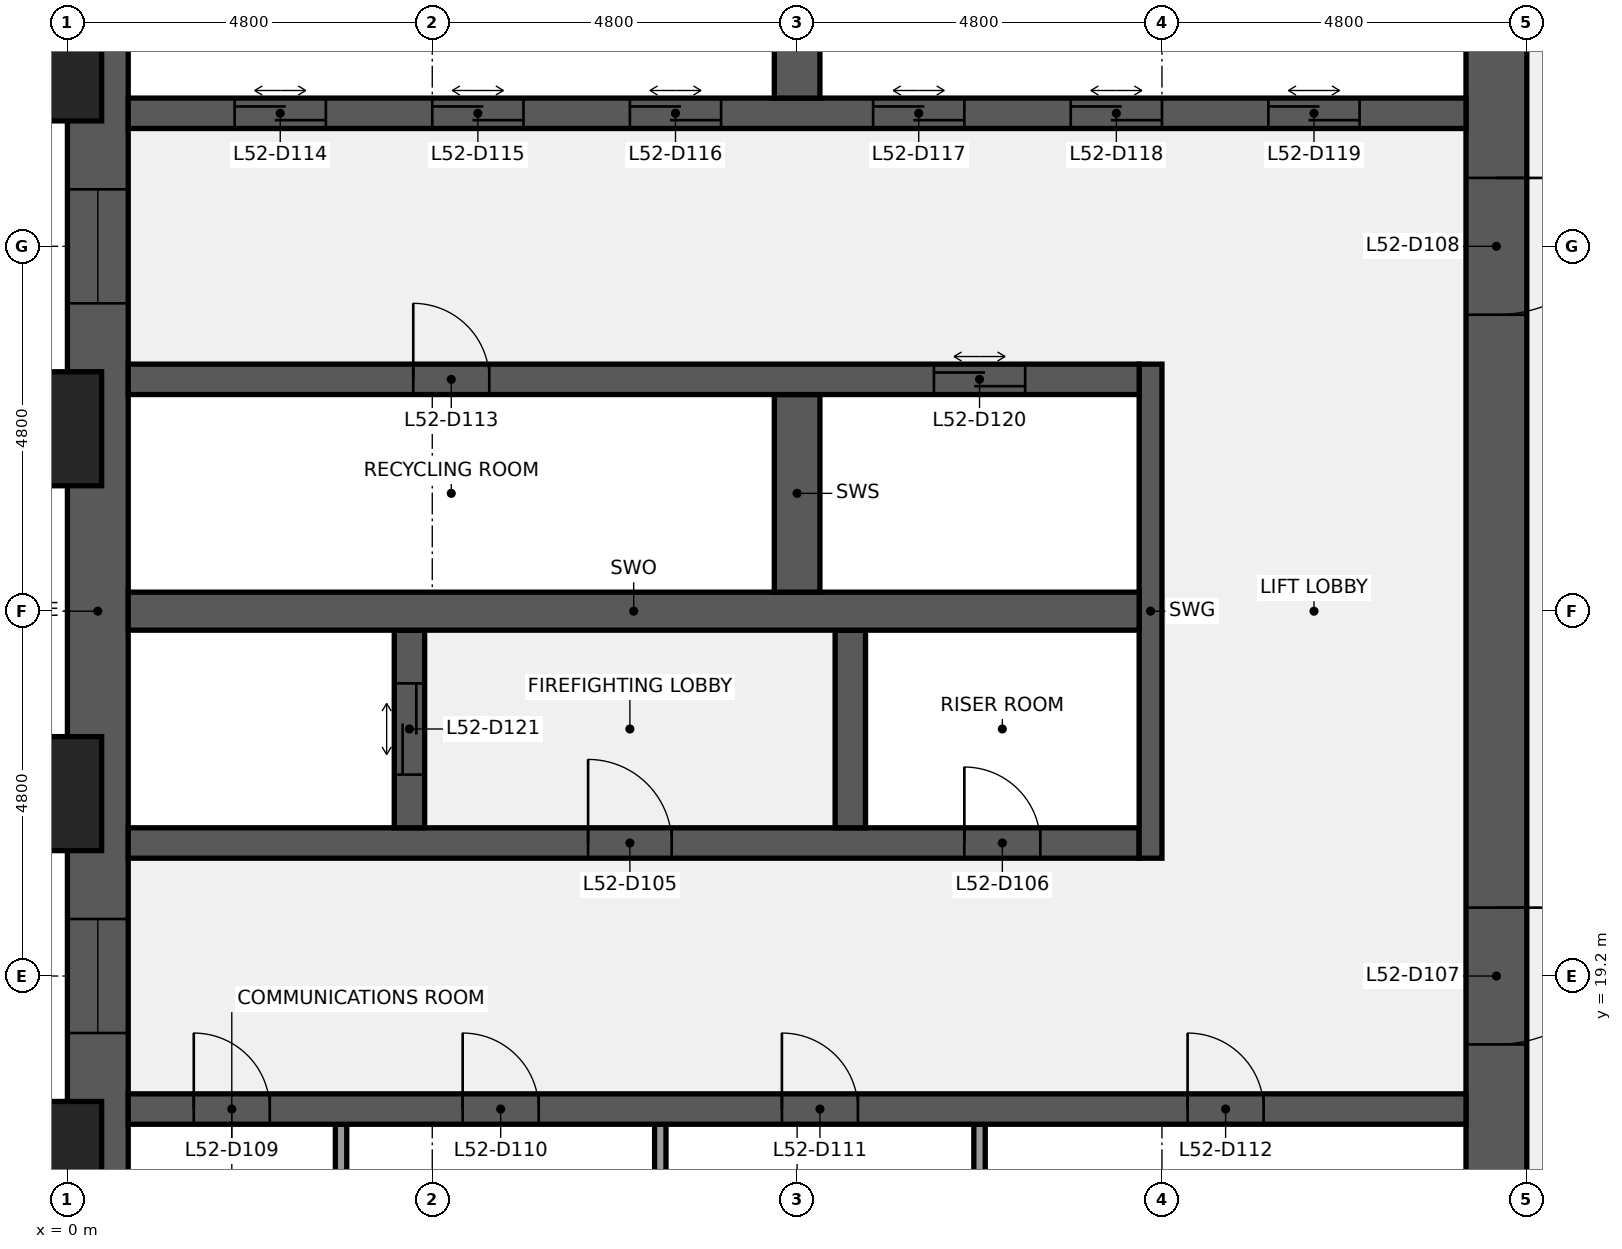
"""IFC4 building model, lengths in metres.
Left out: names, types, materials, properties, quantities, classifications, styles, units other than length and angle.
Written with IfcOpenShell. Run it as: python <this file> out.ifc"""

import sys

from ifc_helpers import new_model, si_unit, direction, frame, frame_2d, origin, origin_2d, place, context, subcontext, project, spatial, rectangle, extrude, element, fill, save


model = new_model("IFC4")
c1 = context("Model", 3, precision=1e-05, world=origin(), true_north=direction((0.0, 1.0)))
c2 = subcontext(c1, "Body", "Model", "MODEL_VIEW")
j1 = project(units=[si_unit("LENGTHUNIT", "METRE"), si_unit("PLANEANGLEUNIT", "RADIAN")], contexts=[c1])
p1 = place(None, origin())
s1 = spatial("IfcSite", under=j1, at=p1, CompositionType="ELEMENT")
p2 = place(p1, origin())
s2 = spatial("IfcBuilding", under=s1, at=p2, CompositionType="ELEMENT")
p3 = place(p2, frame((0.0, 0.0, 237.2)))
s3 = spatial("IfcBuildingStorey", under=s2, at=p3, CompositionType="ELEMENT", Elevation=237.2)
p4 = place(p3, frame((0.4, 9.6, 0.0), z_axis=(0.0, 0.0, 1.0), x_axis=(0.0, 1.0, 0.0)))
e1 = element("IfcWall", 1, at=p4, inside=s3, PredefinedType="SHEAR", context=c2, shape_type="SweptSolid", body=[
    extrude(rectangle(XDim=28.8, YDim=0.8, at=frame_2d((14.4, 0.0))), origin(), (0.0, 0.0, 1.0), 3.84),
])
p5 = place(p4, frame((8.85, 0.0, 0.9)))
e2 = element("IfcOpeningElement", 2, at=p5, cuts=e1, PredefinedType="OPENING", context=c2, shape_type="SweptSolid", body=[
    extrude(rectangle(XDim=1.5, YDim=1.5, at=frame_2d((0.75, 0.75))), frame((0.0, 0.41, 0.0), z_axis=(0.0, -1.0, 0.0), x_axis=(1.0, 0.0, 0.0)), (0.0, 0.0, 1.0), 0.82),
])
p6 = place(p4, frame((18.45, 0.0, 0.9)))
e3 = element("IfcOpeningElement", 3, at=p6, cuts=e1, PredefinedType="OPENING", context=c2, shape_type="SweptSolid", body=[
    extrude(rectangle(XDim=1.5, YDim=1.5, at=frame_2d((0.75, 0.75))), frame((0.0, 0.41, 0.0), z_axis=(0.0, -1.0, 0.0), x_axis=(1.0, 0.0, 0.0)), (0.0, 0.0, 1.0), 0.82),
])
p7 = place(p3, frame((18.8, 38.4, 0.0), z_axis=(0.0, 0.0, 1.0), x_axis=(0.0, -1.0, 0.0)))
e4 = element("IfcWall", 4, at=p7, inside=s3, PredefinedType="SHEAR", context=c2, shape_type="SweptSolid", body=[
    extrude(rectangle(XDim=28.8, YDim=0.8, at=frame_2d((14.4, 0.0))), origin(), (0.0, 0.0, 1.0), 3.84),
])
p8 = place(p7, frame((18.3, 0.0, 0.0)))
e5 = element("IfcOpeningElement", 5, at=p8, cuts=e4, PredefinedType="OPENING", context=c2, shape_type="SweptSolid", body=[
    extrude(rectangle(XDim=1.8, YDim=2.1, at=frame_2d((0.9, 1.05))), frame((0.0, 0.41, 0.0), z_axis=(0.0, -1.0, 0.0), x_axis=(1.0, 0.0, 0.0)), (0.0, 0.0, 1.0), 0.82),
])
p9 = place(p7, frame((8.7, 0.0, 0.0)))
e6 = element("IfcOpeningElement", 6, at=p9, cuts=e4, PredefinedType="OPENING", context=c2, shape_type="SweptSolid", body=[
    extrude(rectangle(XDim=1.8, YDim=2.1, at=frame_2d((0.9, 1.05))), frame((0.0, 0.41, 0.0), z_axis=(0.0, -1.0, 0.0), x_axis=(1.0, 0.0, 0.0)), (0.0, 0.0, 1.0), 0.82),
])
for number, where, z_axis, x_axis in (
    (7, (3.6, 14.65, 0.0), (0.0, 0.0, 1.0), (0.0, 1.0, 0.0)),
    (8, (7.8, 14.65, 0.0), (0.0, 0.0, 1.0), (0.0, 1.0, 0.0)),
    (9, (12.0, 14.65, 0.0), (0.0, 0.0, 1.0), (0.0, 1.0, 0.0)),
):
    element("IfcWall", number, at=place(p3, frame(where, z_axis=z_axis, x_axis=x_axis)), inside=s3, PredefinedType="PARTITIONING", context=c2, shape_type="SweptSolid", body=[
        extrude(rectangle(XDim=2.6, YDim=0.15, at=frame_2d((1.3, 0.0))), origin(), (0.0, 0.0, 1.0), 3.84),
    ])
p10 = place(p3, frame((0.8, 17.45, 0.0), z_axis=(0.0, 0.0, 1.0), x_axis=(1.0, 0.0, 0.0)))
e10 = element("IfcWall", 10, at=p10, inside=s3, PredefinedType="SHEAR", context=c2, shape_type="SweptSolid", body=[
    extrude(rectangle(XDim=17.6, YDim=0.4, at=frame_2d((8.8, 0.0))), origin(), (0.0, 0.0, 1.0), 3.84),
])
p11 = place(p10, frame((0.863, 0.0, 0.0)))
e11 = element("IfcOpeningElement", 11, at=p11, cuts=e10, PredefinedType="OPENING", context=c2, shape_type="SweptSolid", body=[
    extrude(rectangle(XDim=1.0, YDim=2.1, at=frame_2d((0.5, 1.05))), frame((0.0, 0.21, 0.0), z_axis=(0.0, -1.0, 0.0), x_axis=(1.0, 0.0, 0.0)), (0.0, 0.0, 1.0), 0.42),
])
p12 = place(p10, frame((4.4, 0.0, 0.0)))
e12 = element("IfcOpeningElement", 12, at=p12, cuts=e10, PredefinedType="OPENING", context=c2, shape_type="SweptSolid", body=[
    extrude(rectangle(XDim=1.0, YDim=2.1, at=frame_2d((0.5, 1.05))), frame((0.0, 0.21, 0.0), z_axis=(0.0, -1.0, 0.0), x_axis=(1.0, 0.0, 0.0)), (0.0, 0.0, 1.0), 0.42),
])
p13 = place(p10, frame((8.6, 0.0, 0.0)))
e13 = element("IfcOpeningElement", 13, at=p13, cuts=e10, PredefinedType="OPENING", context=c2, shape_type="SweptSolid", body=[
    extrude(rectangle(XDim=1.0, YDim=2.1, at=frame_2d((0.5, 1.05))), frame((0.0, 0.21, 0.0), z_axis=(0.0, -1.0, 0.0), x_axis=(1.0, 0.0, 0.0)), (0.0, 0.0, 1.0), 0.42),
])
p14 = place(p10, frame((13.938, 0.0, 0.0)))
e14 = element("IfcOpeningElement", 14, at=p14, cuts=e10, PredefinedType="OPENING", context=c2, shape_type="SweptSolid", body=[
    extrude(rectangle(XDim=1.0, YDim=2.1, at=frame_2d((0.5, 1.05))), frame((0.0, 0.21, 0.0), z_axis=(0.0, -1.0, 0.0), x_axis=(1.0, 0.0, 0.0)), (0.0, 0.0, 1.0), 0.42),
])
p15 = place(p3, frame((0.8, 20.95, 0.0), z_axis=(0.0, 0.0, 1.0), x_axis=(1.0, 0.0, 0.0)))
e15 = element("IfcWall", 15, at=p15, inside=s3, PredefinedType="SHEAR", context=c2, shape_type="SweptSolid", body=[
    extrude(rectangle(XDim=13.3, YDim=0.4, at=frame_2d((6.65, 0.0))), origin(), (0.0, 0.0, 1.0), 3.84),
])
p16 = place(p15, frame((6.05, 0.0, 0.0)))
e16 = element("IfcOpeningElement", 16, at=p16, cuts=e15, PredefinedType="OPENING", context=c2, shape_type="SweptSolid", body=[
    extrude(rectangle(XDim=1.1, YDim=2.1, at=frame_2d((0.55, 1.05))), frame((0.0, 0.21, 0.0), z_axis=(0.0, -1.0, 0.0), x_axis=(1.0, 0.0, 0.0)), (0.0, 0.0, 1.0), 0.42),
])
p17 = place(p15, frame((11.0, 0.0, 0.0)))
e17 = element("IfcOpeningElement", 17, at=p17, cuts=e15, PredefinedType="OPENING", context=c2, shape_type="SweptSolid", body=[
    extrude(rectangle(XDim=1.0, YDim=2.1, at=frame_2d((0.5, 1.05))), frame((0.0, 0.21, 0.0), z_axis=(0.0, -1.0, 0.0), x_axis=(1.0, 0.0, 0.0)), (0.0, 0.0, 1.0), 0.42),
])
p18 = place(p3, frame((14.25, 20.75, 0.0), z_axis=(0.0, 0.0, 1.0), x_axis=(0.0, 1.0, 0.0)))
e18 = element("IfcWall", 18, at=p18, inside=s3, PredefinedType="SHEAR", context=c2, shape_type="SweptSolid", body=[
    extrude(rectangle(XDim=6.5, YDim=0.3, at=frame_2d((3.25, 0.0))), origin(), (0.0, 0.0, 1.0), 3.84),
])
p19 = place(p3, frame((4.5, 21.15, 0.0), z_axis=(0.0, 0.0, 1.0), x_axis=(0.0, 1.0, 0.0)))
e19 = element("IfcWall", 19, at=p19, inside=s3, PredefinedType="SHEAR", context=c2, shape_type="SweptSolid", body=[
    extrude(rectangle(XDim=2.6, YDim=0.4, at=frame_2d((1.3, 0.0))), origin(), (0.0, 0.0, 1.0), 3.84),
])
p20 = place(p19, frame((0.7, 0.0, 0.0)))
e20 = element("IfcOpeningElement", 20, at=p20, cuts=e19, PredefinedType="OPENING", context=c2, shape_type="SweptSolid", body=[
    extrude(rectangle(XDim=1.2, YDim=2.1, at=frame_2d((0.6, 1.05))), frame((0.0, 0.21, 0.0), z_axis=(0.0, -1.0, 0.0), x_axis=(1.0, 0.0, 0.0)), (0.0, 0.0, 1.0), 0.42),
])
p21 = place(p3, frame((10.3, 21.15, 0.0), z_axis=(0.0, 0.0, 1.0), x_axis=(0.0, 1.0, 0.0)))
e21 = element("IfcWall", 21, at=p21, inside=s3, PredefinedType="SHEAR", context=c2, shape_type="SweptSolid", body=[
    extrude(rectangle(XDim=2.6, YDim=0.4, at=frame_2d((1.3, 0.0))), origin(), (0.0, 0.0, 1.0), 3.84),
])
p22 = place(p3, frame((0.8, 24.0, 0.0), z_axis=(0.0, 0.0, 1.0), x_axis=(1.0, 0.0, 0.0)))
e22 = element("IfcWall", 22, at=p22, inside=s3, PredefinedType="SHEAR", context=c2, shape_type="SweptSolid", body=[
    extrude(rectangle(XDim=13.3, YDim=0.5, at=frame_2d((6.65, 0.0))), origin(), (0.0, 0.0, 1.0), 3.84),
])
p23 = place(p3, frame((9.6, 24.25, 0.0), z_axis=(0.0, 0.0, 1.0), x_axis=(0.0, 1.0, 0.0)))
e23 = element("IfcWall", 23, at=p23, inside=s3, PredefinedType="SHEAR", context=c2, shape_type="SweptSolid", body=[
    extrude(rectangle(XDim=2.6, YDim=0.6, at=frame_2d((1.3, 0.0))), origin(), (0.0, 0.0, 1.0), 3.84),
])
p24 = place(p3, frame((0.8, 27.05, 0.0), z_axis=(0.0, 0.0, 1.0), x_axis=(1.0, 0.0, 0.0)))
e24 = element("IfcWall", 24, at=p24, inside=s3, PredefinedType="SHEAR", context=c2, shape_type="SweptSolid", body=[
    extrude(rectangle(XDim=13.3, YDim=0.4, at=frame_2d((6.65, 0.0))), origin(), (0.0, 0.0, 1.0), 3.84),
])
p25 = place(p24, frame((3.75, 0.0, 0.0)))
e25 = element("IfcOpeningElement", 25, at=p25, cuts=e24, PredefinedType="OPENING", context=c2, shape_type="SweptSolid", body=[
    extrude(rectangle(XDim=1.0, YDim=2.1, at=frame_2d((0.5, 1.05))), frame((0.0, 0.21, 0.0), z_axis=(0.0, -1.0, 0.0), x_axis=(1.0, 0.0, 0.0)), (0.0, 0.0, 1.0), 0.42),
])
p26 = place(p24, frame((10.6, 0.0, 0.0)))
e26 = element("IfcOpeningElement", 26, at=p26, cuts=e24, PredefinedType="OPENING", context=c2, shape_type="SweptSolid", body=[
    extrude(rectangle(XDim=1.2, YDim=2.1, at=frame_2d((0.6, 1.05))), frame((0.0, 0.21, 0.0), z_axis=(0.0, -1.0, 0.0), x_axis=(1.0, 0.0, 0.0)), (0.0, 0.0, 1.0), 0.42),
])
p27 = place(p3, frame((0.8, 30.55, 0.0), z_axis=(0.0, 0.0, 1.0), x_axis=(1.0, 0.0, 0.0)))
e27 = element("IfcWall", 27, at=p27, inside=s3, PredefinedType="SHEAR", context=c2, shape_type="SweptSolid", body=[
    extrude(rectangle(XDim=17.6, YDim=0.4, at=frame_2d((8.8, 0.0))), origin(), (0.0, 0.0, 1.0), 3.84),
])
p28 = place(p27, frame((1.4, 0.0, 0.0)))
e28 = element("IfcOpeningElement", 28, at=p28, cuts=e27, PredefinedType="OPENING", context=c2, shape_type="SweptSolid", body=[
    extrude(rectangle(XDim=1.2, YDim=2.1, at=frame_2d((0.6, 1.05))), frame((0.0, 0.21, 0.0), z_axis=(0.0, -1.0, 0.0), x_axis=(1.0, 0.0, 0.0)), (0.0, 0.0, 1.0), 0.42),
])
p29 = place(p27, frame((4.0, 0.0, 0.0)))
e29 = element("IfcOpeningElement", 29, at=p29, cuts=e27, PredefinedType="OPENING", context=c2, shape_type="SweptSolid", body=[
    extrude(rectangle(XDim=1.2, YDim=2.1, at=frame_2d((0.6, 1.05))), frame((0.0, 0.21, 0.0), z_axis=(0.0, -1.0, 0.0), x_axis=(1.0, 0.0, 0.0)), (0.0, 0.0, 1.0), 0.42),
])
p30 = place(p27, frame((6.6, 0.0, 0.0)))
e30 = element("IfcOpeningElement", 30, at=p30, cuts=e27, PredefinedType="OPENING", context=c2, shape_type="SweptSolid", body=[
    extrude(rectangle(XDim=1.2, YDim=2.1, at=frame_2d((0.6, 1.05))), frame((0.0, 0.21, 0.0), z_axis=(0.0, -1.0, 0.0), x_axis=(1.0, 0.0, 0.0)), (0.0, 0.0, 1.0), 0.42),
])
p31 = place(p27, frame((9.8, 0.0, 0.0)))
e31 = element("IfcOpeningElement", 31, at=p31, cuts=e27, PredefinedType="OPENING", context=c2, shape_type="SweptSolid", body=[
    extrude(rectangle(XDim=1.2, YDim=2.1, at=frame_2d((0.6, 1.05))), frame((0.0, 0.21, 0.0), z_axis=(0.0, -1.0, 0.0), x_axis=(1.0, 0.0, 0.0)), (0.0, 0.0, 1.0), 0.42),
])
p32 = place(p27, frame((12.4, 0.0, 0.0)))
e32 = element("IfcOpeningElement", 32, at=p32, cuts=e27, PredefinedType="OPENING", context=c2, shape_type="SweptSolid", body=[
    extrude(rectangle(XDim=1.2, YDim=2.1, at=frame_2d((0.6, 1.05))), frame((0.0, 0.21, 0.0), z_axis=(0.0, -1.0, 0.0), x_axis=(1.0, 0.0, 0.0)), (0.0, 0.0, 1.0), 0.42),
])
p33 = place(p27, frame((15.0, 0.0, 0.0)))
e33 = element("IfcOpeningElement", 33, at=p33, cuts=e27, PredefinedType="OPENING", context=c2, shape_type="SweptSolid", body=[
    extrude(rectangle(XDim=1.2, YDim=2.1, at=frame_2d((0.6, 1.05))), frame((0.0, 0.21, 0.0), z_axis=(0.0, -1.0, 0.0), x_axis=(1.0, 0.0, 0.0)), (0.0, 0.0, 1.0), 0.42),
])
p34 = place(p3, frame((9.6, 30.75, 0.0), z_axis=(0.0, 0.0, 1.0), x_axis=(0.0, 1.0, 0.0)))
e34 = element("IfcWall", 34, at=p34, inside=s3, PredefinedType="SHEAR", context=c2, shape_type="SweptSolid", body=[
    extrude(rectangle(XDim=2.6, YDim=0.6, at=frame_2d((1.3, 0.0))), origin(), (0.0, 0.0, 1.0), 3.84),
])
for number, where, z_axis, x_axis in (
    (35, (-0.75, 16.8, 0.0), (0.0, 0.0, 1.0), (0.0, 1.0, 0.0)),
    (36, (-0.75, 21.6, 0.0), (0.0, 0.0, 1.0), (0.0, 1.0, 0.0)),
    (37, (-0.75, 26.4, 0.0), (0.0, 0.0, 1.0), (0.0, 1.0, 0.0)),
    (38, (-0.75, 31.2, 0.0), (0.0, 0.0, 1.0), (0.0, 1.0, 0.0)),
):
    element("IfcColumn", number, at=place(p3, frame(where, z_axis=z_axis, x_axis=x_axis)), inside=s3, PredefinedType="PILASTER", context=c2, shape_type="SweptSolid", body=[
        extrude(rectangle(XDim=2.4, YDim=1.5, at=origin_2d()), origin(), (0.0, 0.0, 1.0), 4.0),
    ])
p35 = place(p16, origin())
e39 = element("IfcDoor", 39, at=p35, inside=s3, OperationType="SINGLE_SWING_LEFT", PredefinedType="DOOR", context=c2, shape_type="SweptSolid", body=[
    extrude(rectangle(XDim=1.1, YDim=2.1, at=frame_2d((0.55, 1.05))), frame((0.0, 0.025, 0.0), z_axis=(0.0, -1.0, 0.0), x_axis=(1.0, 0.0, 0.0)), (0.0, 0.0, 1.0), 0.05),
])
fill(e16, e39)
p36 = place(p17, origin())
e40 = element("IfcDoor", 40, at=p36, inside=s3, OperationType="SINGLE_SWING_LEFT", PredefinedType="DOOR", context=c2, shape_type="SweptSolid", body=[
    extrude(rectangle(XDim=1.0, YDim=2.1, at=frame_2d((0.5, 1.05))), frame((0.0, 0.025, 0.0), z_axis=(0.0, -1.0, 0.0), x_axis=(1.0, 0.0, 0.0)), (0.0, 0.0, 1.0), 0.05),
])
fill(e17, e40)
p37 = place(p8, origin())
e41 = element("IfcDoor", 41, at=p37, inside=s3, OperationType="DOUBLE_DOOR_SINGLE_SWING", PredefinedType="DOOR", context=c2, shape_type="SweptSolid", body=[
    extrude(rectangle(XDim=1.8, YDim=2.1, at=frame_2d((0.9, 1.05))), frame((0.0, 0.025, 0.0), z_axis=(0.0, -1.0, 0.0), x_axis=(1.0, 0.0, 0.0)), (0.0, 0.0, 1.0), 0.05),
])
fill(e5, e41)
p38 = place(p9, origin())
e42 = element("IfcDoor", 42, at=p38, inside=s3, OperationType="DOUBLE_DOOR_SINGLE_SWING", PredefinedType="DOOR", context=c2, shape_type="SweptSolid", body=[
    extrude(rectangle(XDim=1.8, YDim=2.1, at=frame_2d((0.9, 1.05))), frame((0.0, 0.025, 0.0), z_axis=(0.0, -1.0, 0.0), x_axis=(1.0, 0.0, 0.0)), (0.0, 0.0, 1.0), 0.05),
])
fill(e6, e42)
p39 = place(p11, origin())
e43 = element("IfcDoor", 43, at=p39, inside=s3, OperationType="SINGLE_SWING_LEFT", PredefinedType="DOOR", context=c2, shape_type="SweptSolid", body=[
    extrude(rectangle(XDim=1.0, YDim=2.1, at=frame_2d((0.5, 1.05))), frame((0.0, 0.025, 0.0), z_axis=(0.0, -1.0, 0.0), x_axis=(1.0, 0.0, 0.0)), (0.0, 0.0, 1.0), 0.05),
])
fill(e11, e43)
p40 = place(p12, origin())
e44 = element("IfcDoor", 44, at=p40, inside=s3, OperationType="SINGLE_SWING_LEFT", PredefinedType="DOOR", context=c2, shape_type="SweptSolid", body=[
    extrude(rectangle(XDim=1.0, YDim=2.1, at=frame_2d((0.5, 1.05))), frame((0.0, 0.025, 0.0), z_axis=(0.0, -1.0, 0.0), x_axis=(1.0, 0.0, 0.0)), (0.0, 0.0, 1.0), 0.05),
])
fill(e12, e44)
p41 = place(p13, origin())
e45 = element("IfcDoor", 45, at=p41, inside=s3, OperationType="SINGLE_SWING_LEFT", PredefinedType="DOOR", context=c2, shape_type="SweptSolid", body=[
    extrude(rectangle(XDim=1.0, YDim=2.1, at=frame_2d((0.5, 1.05))), frame((0.0, 0.025, 0.0), z_axis=(0.0, -1.0, 0.0), x_axis=(1.0, 0.0, 0.0)), (0.0, 0.0, 1.0), 0.05),
])
fill(e13, e45)
p42 = place(p14, origin())
e46 = element("IfcDoor", 46, at=p42, inside=s3, OperationType="SINGLE_SWING_LEFT", PredefinedType="DOOR", context=c2, shape_type="SweptSolid", body=[
    extrude(rectangle(XDim=1.0, YDim=2.1, at=frame_2d((0.5, 1.05))), frame((0.0, 0.025, 0.0), z_axis=(0.0, -1.0, 0.0), x_axis=(1.0, 0.0, 0.0)), (0.0, 0.0, 1.0), 0.05),
])
fill(e14, e46)
p43 = place(p25, origin())
e47 = element("IfcDoor", 47, at=p43, inside=s3, OperationType="SINGLE_SWING_LEFT", PredefinedType="DOOR", context=c2, shape_type="SweptSolid", body=[
    extrude(rectangle(XDim=1.0, YDim=2.1, at=frame_2d((0.5, 1.05))), frame((0.0, 0.025, 0.0), z_axis=(0.0, -1.0, 0.0), x_axis=(1.0, 0.0, 0.0)), (0.0, 0.0, 1.0), 0.05),
])
fill(e25, e47)
p44 = place(p28, origin())
e48 = element("IfcDoor", 48, at=p44, inside=s3, OperationType="DOUBLE_DOOR_SLIDING", PredefinedType="DOOR", context=c2, shape_type="SweptSolid", body=[
    extrude(rectangle(XDim=1.2, YDim=2.1, at=frame_2d((0.6, 1.05))), frame((0.0, 0.025, 0.0), z_axis=(0.0, -1.0, 0.0), x_axis=(1.0, 0.0, 0.0)), (0.0, 0.0, 1.0), 0.05),
])
fill(e28, e48)
p45 = place(p29, origin())
e49 = element("IfcDoor", 49, at=p45, inside=s3, OperationType="DOUBLE_DOOR_SLIDING", PredefinedType="DOOR", context=c2, shape_type="SweptSolid", body=[
    extrude(rectangle(XDim=1.2, YDim=2.1, at=frame_2d((0.6, 1.05))), frame((0.0, 0.025, 0.0), z_axis=(0.0, -1.0, 0.0), x_axis=(1.0, 0.0, 0.0)), (0.0, 0.0, 1.0), 0.05),
])
fill(e29, e49)
p46 = place(p30, origin())
e50 = element("IfcDoor", 50, at=p46, inside=s3, OperationType="DOUBLE_DOOR_SLIDING", PredefinedType="DOOR", context=c2, shape_type="SweptSolid", body=[
    extrude(rectangle(XDim=1.2, YDim=2.1, at=frame_2d((0.6, 1.05))), frame((0.0, 0.025, 0.0), z_axis=(0.0, -1.0, 0.0), x_axis=(1.0, 0.0, 0.0)), (0.0, 0.0, 1.0), 0.05),
])
fill(e30, e50)
p47 = place(p31, origin())
e51 = element("IfcDoor", 51, at=p47, inside=s3, OperationType="DOUBLE_DOOR_SLIDING", PredefinedType="DOOR", context=c2, shape_type="SweptSolid", body=[
    extrude(rectangle(XDim=1.2, YDim=2.1, at=frame_2d((0.6, 1.05))), frame((0.0, 0.025, 0.0), z_axis=(0.0, -1.0, 0.0), x_axis=(1.0, 0.0, 0.0)), (0.0, 0.0, 1.0), 0.05),
])
fill(e31, e51)
p48 = place(p32, origin())
e52 = element("IfcDoor", 52, at=p48, inside=s3, OperationType="DOUBLE_DOOR_SLIDING", PredefinedType="DOOR", context=c2, shape_type="SweptSolid", body=[
    extrude(rectangle(XDim=1.2, YDim=2.1, at=frame_2d((0.6, 1.05))), frame((0.0, 0.025, 0.0), z_axis=(0.0, -1.0, 0.0), x_axis=(1.0, 0.0, 0.0)), (0.0, 0.0, 1.0), 0.05),
])
fill(e32, e52)
p49 = place(p33, origin())
e53 = element("IfcDoor", 53, at=p49, inside=s3, OperationType="DOUBLE_DOOR_SLIDING", PredefinedType="DOOR", context=c2, shape_type="SweptSolid", body=[
    extrude(rectangle(XDim=1.2, YDim=2.1, at=frame_2d((0.6, 1.05))), frame((0.0, 0.025, 0.0), z_axis=(0.0, -1.0, 0.0), x_axis=(1.0, 0.0, 0.0)), (0.0, 0.0, 1.0), 0.05),
])
fill(e33, e53)
p50 = place(p26, origin())
e54 = element("IfcDoor", 54, at=p50, inside=s3, OperationType="DOUBLE_DOOR_SLIDING", PredefinedType="DOOR", context=c2, shape_type="SweptSolid", body=[
    extrude(rectangle(XDim=1.2, YDim=2.1, at=frame_2d((0.6, 1.05))), frame((0.0, 0.025, 0.0), z_axis=(0.0, -1.0, 0.0), x_axis=(1.0, 0.0, 0.0)), (0.0, 0.0, 1.0), 0.05),
])
fill(e26, e54)
p51 = place(p20, origin())
e55 = element("IfcDoor", 55, at=p51, inside=s3, OperationType="DOUBLE_DOOR_SLIDING", PredefinedType="DOOR", context=c2, shape_type="SweptSolid", body=[
    extrude(rectangle(XDim=1.2, YDim=2.1, at=frame_2d((0.6, 1.05))), frame((0.0, 0.025, 0.0), z_axis=(0.0, -1.0, 0.0), x_axis=(1.0, 0.0, 0.0)), (0.0, 0.0, 1.0), 0.05),
])
fill(e20, e55)
p52 = place(p5, origin())
e56 = element("IfcWindow", 56, at=p52, inside=s3, PartitioningType="SINGLE_PANEL", PredefinedType="WINDOW", context=c2, shape_type="SweptSolid", body=[
    extrude(rectangle(XDim=1.5, YDim=1.5, at=frame_2d((0.75, 0.75))), frame((0.0, 0.03, 0.0), z_axis=(0.0, -1.0, 0.0), x_axis=(1.0, 0.0, 0.0)), (0.0, 0.0, 1.0), 0.06),
])
fill(e2, e56)
p53 = place(p6, origin())
e57 = element("IfcWindow", 57, at=p53, inside=s3, PartitioningType="SINGLE_PANEL", PredefinedType="WINDOW", context=c2, shape_type="SweptSolid", body=[
    extrude(rectangle(XDim=1.5, YDim=1.5, at=frame_2d((0.75, 0.75))), frame((0.0, 0.03, 0.0), z_axis=(0.0, -1.0, 0.0), x_axis=(1.0, 0.0, 0.0)), (0.0, 0.0, 1.0), 0.06),
])
fill(e3, e57)
save(model, sys.argv[1])
